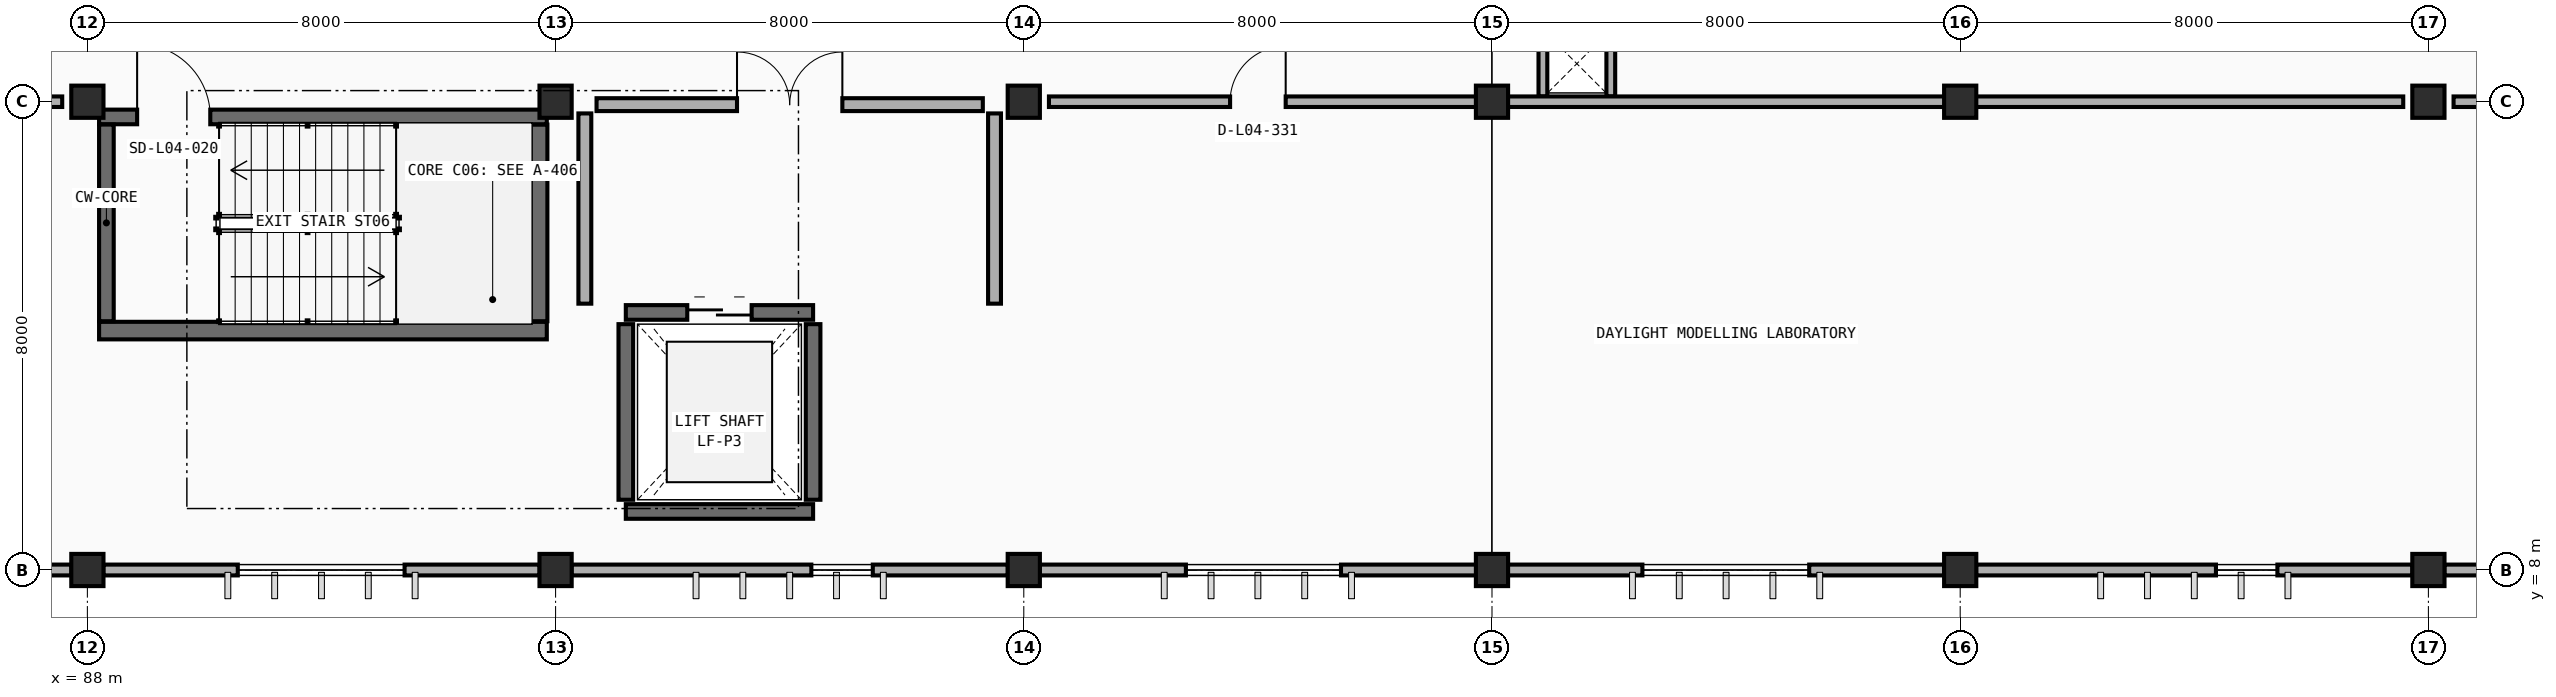
"""IFC4 building model, lengths in metres.
Left out: names, types, materials, properties, quantities, classifications, styles, units other than length and angle.
Written with IfcOpenShell. Run it as: python <this file> out.ifc"""

import sys

from ifc_helpers import new_model, si_unit, direction, frame, frame_2d, origin, origin_2d, place, context, subcontext, project, spatial, rectangle, extrude, element, fill, save


model = new_model("IFC4")
c1 = context("Model", 3, precision=1e-05, world=origin(), true_north=direction((0.0, 1.0)))
c2 = subcontext(c1, "Body", "Model", "MODEL_VIEW")
j1 = project(units=[si_unit("LENGTHUNIT", "METRE"), si_unit("PLANEANGLEUNIT", "RADIAN")], contexts=[c1])
p1 = place(None, origin())
s1 = spatial("IfcSite", under=j1, at=p1, CompositionType="ELEMENT")
p2 = place(p1, origin())
s2 = spatial("IfcBuilding", under=s1, at=p2, CompositionType="ELEMENT")
p3 = place(p2, frame((0.0, 0.0, 13.8)))
s3 = spatial("IfcBuildingStorey", under=s2, at=p3, CompositionType="ELEMENT", Elevation=13.8)
for number, where, z_axis, x_axis in (
    (1, (88.0, 8.0, 0.0), (0.0, 0.0, 1.0), (1.0, 0.0, 0.0)),
    (2, (96.0, 8.0, 0.0), (0.0, 0.0, 1.0), (1.0, 0.0, 0.0)),
    (3, (104.0, 8.0, 0.0), (0.0, 0.0, 1.0), (1.0, 0.0, 0.0)),
    (4, (112.0, 8.0, 0.0), (0.0, 0.0, 1.0), (1.0, 0.0, 0.0)),
    (5, (120.0, 8.0, 0.0), (0.0, 0.0, 1.0), (1.0, 0.0, 0.0)),
    (6, (128.0, 8.0, 0.0), (0.0, 0.0, 1.0), (1.0, 0.0, 0.0)),
    (7, (88.0, 16.0, 0.0), (0.0, 0.0, 1.0), (1.0, 0.0, 0.0)),
    (8, (96.0, 16.0, 0.0), (0.0, 0.0, 1.0), (1.0, 0.0, 0.0)),
    (9, (104.0, 16.0, 0.0), (0.0, 0.0, 1.0), (1.0, 0.0, 0.0)),
    (10, (112.0, 16.0, 0.0), (0.0, 0.0, 1.0), (1.0, 0.0, 0.0)),
    (11, (120.0, 16.0, 0.0), (0.0, 0.0, 1.0), (1.0, 0.0, 0.0)),
    (12, (128.0, 16.0, 0.0), (0.0, 0.0, 1.0), (1.0, 0.0, 0.0)),
):
    element("IfcColumn", number, at=place(p3, frame(where, z_axis=z_axis, x_axis=x_axis)), inside=s3, PredefinedType="COLUMN", context=c2, shape_type="SweptSolid", body=[
        extrude(rectangle(XDim=0.55, YDim=0.55, at=origin_2d()), origin(), (0.0, 0.0, 1.0), 4.2),
    ])
p4 = place(p3, frame((87.728, 8.0, 0.0), z_axis=(0.0, 0.0, 1.0), x_axis=(-1.0, 0.0, 0.0)))
e13 = element("IfcWall", 13, at=p4, inside=s3, PredefinedType="STANDARD", context=c2, shape_type="SweptSolid", body=[
    extrude(rectangle(XDim=7.456, YDim=0.185, at=frame_2d((3.728, 0.0))), origin(), (0.0, 0.0, 1.0), 3.325),
])
p5 = place(p4, frame((2.308, 0.0, 0.9)))
e14 = element("IfcOpeningElement", 14, at=p5, cuts=e13, PredefinedType="OPENING", context=c2, shape_type="SweptSolid", body=[
    extrude(rectangle(XDim=2.65, YDim=1.25, at=frame_2d((1.325, 0.625))), frame((0.0, 0.103, 0.0), z_axis=(0.0, -1.0, 0.0), x_axis=(1.0, 0.0, 0.0)), (0.0, 0.0, 1.0), 0.205),
])
p6 = place(p3, frame((95.728, 8.0, 0.0), z_axis=(0.0, 0.0, 1.0), x_axis=(-1.0, 0.0, 0.0)))
e15 = element("IfcWall", 15, at=p6, inside=s3, PredefinedType="STANDARD", context=c2, shape_type="SweptSolid", body=[
    extrude(rectangle(XDim=7.456, YDim=0.185, at=frame_2d((3.728, 0.0))), origin(), (0.0, 0.0, 1.0), 3.325),
])
p7 = place(p6, frame((2.308, 0.0, 0.9)))
e16 = element("IfcOpeningElement", 16, at=p7, cuts=e15, PredefinedType="OPENING", context=c2, shape_type="SweptSolid", body=[
    extrude(rectangle(XDim=2.85, YDim=1.25, at=frame_2d((1.425, 0.625))), frame((0.0, 0.103, 0.0), z_axis=(0.0, -1.0, 0.0), x_axis=(1.0, 0.0, 0.0)), (0.0, 0.0, 1.0), 0.205),
])
p8 = place(p3, frame((103.728, 8.0, 0.0), z_axis=(0.0, 0.0, 1.0), x_axis=(-1.0, 0.0, 0.0)))
e17 = element("IfcWall", 17, at=p8, inside=s3, PredefinedType="STANDARD", context=c2, shape_type="SweptSolid", body=[
    extrude(rectangle(XDim=7.456, YDim=0.185, at=frame_2d((3.728, 0.0))), origin(), (0.0, 0.0, 1.0), 3.325),
])
p9 = place(p8, frame((2.308, 0.0, 0.9)))
e18 = element("IfcOpeningElement", 18, at=p9, cuts=e17, PredefinedType="OPENING", context=c2, shape_type="SweptSolid", body=[
    extrude(rectangle(XDim=1.05, YDim=1.4, at=frame_2d((0.525, 0.7))), frame((0.0, 0.103, 0.0), z_axis=(0.0, -1.0, 0.0), x_axis=(1.0, 0.0, 0.0)), (0.0, 0.0, 1.0), 0.205),
])
p10 = place(p3, frame((111.728, 8.0, 0.0), z_axis=(0.0, 0.0, 1.0), x_axis=(-1.0, 0.0, 0.0)))
e19 = element("IfcWall", 19, at=p10, inside=s3, PredefinedType="STANDARD", context=c2, shape_type="SweptSolid", body=[
    extrude(rectangle(XDim=7.456, YDim=0.185, at=frame_2d((3.728, 0.0))), origin(), (0.0, 0.0, 1.0), 3.325),
])
p11 = place(p10, frame((2.308, 0.0, 0.9)))
e20 = element("IfcOpeningElement", 20, at=p11, cuts=e19, PredefinedType="OPENING", context=c2, shape_type="SweptSolid", body=[
    extrude(rectangle(XDim=2.65, YDim=1.25, at=frame_2d((1.325, 0.625))), frame((0.0, 0.103, 0.0), z_axis=(0.0, -1.0, 0.0), x_axis=(1.0, 0.0, 0.0)), (0.0, 0.0, 1.0), 0.205),
])
p12 = place(p3, frame((119.728, 8.0, 0.0), z_axis=(0.0, 0.0, 1.0), x_axis=(-1.0, 0.0, 0.0)))
e21 = element("IfcWall", 21, at=p12, inside=s3, PredefinedType="STANDARD", context=c2, shape_type="SweptSolid", body=[
    extrude(rectangle(XDim=7.456, YDim=0.185, at=frame_2d((3.728, 0.0))), origin(), (0.0, 0.0, 1.0), 3.325),
])
p13 = place(p12, frame((2.308, 0.0, 0.9)))
e22 = element("IfcOpeningElement", 22, at=p13, cuts=e21, PredefinedType="OPENING", context=c2, shape_type="SweptSolid", body=[
    extrude(rectangle(XDim=2.85, YDim=1.25, at=frame_2d((1.425, 0.625))), frame((0.0, 0.103, 0.0), z_axis=(0.0, -1.0, 0.0), x_axis=(1.0, 0.0, 0.0)), (0.0, 0.0, 1.0), 0.205),
])
p14 = place(p3, frame((127.728, 8.0, 0.0), z_axis=(0.0, 0.0, 1.0), x_axis=(-1.0, 0.0, 0.0)))
e23 = element("IfcWall", 23, at=p14, inside=s3, PredefinedType="STANDARD", context=c2, shape_type="SweptSolid", body=[
    extrude(rectangle(XDim=7.456, YDim=0.185, at=frame_2d((3.728, 0.0))), origin(), (0.0, 0.0, 1.0), 3.325),
])
p15 = place(p14, frame((2.308, 0.0, 0.9)))
e24 = element("IfcOpeningElement", 24, at=p15, cuts=e23, PredefinedType="OPENING", context=c2, shape_type="SweptSolid", body=[
    extrude(rectangle(XDim=1.05, YDim=1.4, at=frame_2d((0.525, 0.7))), frame((0.0, 0.103, 0.0), z_axis=(0.0, -1.0, 0.0), x_axis=(1.0, 0.0, 0.0)), (0.0, 0.0, 1.0), 0.205),
])
p16 = place(p3, frame((135.728, 8.0, 0.0), z_axis=(0.0, 0.0, 1.0), x_axis=(-1.0, 0.0, 0.0)))
e25 = element("IfcWall", 25, at=p16, inside=s3, PredefinedType="STANDARD", context=c2, shape_type="SweptSolid", body=[
    extrude(rectangle(XDim=7.456, YDim=0.185, at=frame_2d((3.728, 0.0))), origin(), (0.0, 0.0, 1.0), 3.325),
])
p17 = place(p16, frame((2.308, 0.0, 0.9)))
e26 = element("IfcOpeningElement", 26, at=p17, cuts=e25, PredefinedType="OPENING", context=c2, shape_type="SweptSolid", body=[
    extrude(rectangle(XDim=2.65, YDim=1.25, at=frame_2d((1.325, 0.625))), frame((0.0, 0.103, 0.0), z_axis=(0.0, -1.0, 0.0), x_axis=(1.0, 0.0, 0.0)), (0.0, 0.0, 1.0), 0.205),
])
p18 = place(p3, frame((88.2, 12.09, 0.0), z_axis=(0.0, 0.0, 1.0), x_axis=(1.0, 0.0, 0.0)))
e27 = element("IfcWall", 27, at=p18, inside=s3, PredefinedType="SHEAR", context=c2, shape_type="SweptSolid", body=[
    extrude(rectangle(XDim=7.65, YDim=0.3, at=frame_2d((3.825, 0.0))), origin(), (0.0, 0.0, 1.0), 4.2),
])
p19 = place(p3, frame((95.71, 12.25, 0.0), z_axis=(0.0, 0.0, 1.0), x_axis=(0.0, 1.0, 0.0)))
e28 = element("IfcWall", 28, at=p19, inside=s3, PredefinedType="SHEAR", context=c2, shape_type="SweptSolid", body=[
    extrude(rectangle(XDim=3.36, YDim=0.3, at=frame_2d((1.68, 0.0))), origin(), (0.0, 0.0, 1.0), 4.2),
])
p20 = place(p3, frame((88.2, 15.74, 0.0), z_axis=(0.0, 0.0, 1.0), x_axis=(1.0, 0.0, 0.0)))
e29 = element("IfcWall", 29, at=p20, inside=s3, PredefinedType="SOLIDWALL", context=c2, shape_type="SweptSolid", body=[
    extrude(rectangle(XDim=7.65, YDim=0.25, at=frame_2d((3.825, 0.0))), origin(), (0.0, 0.0, 1.0), 4.2),
])
p21 = place(p20, frame((0.65, 0.0, 0.0)))
e30 = element("IfcOpeningElement", 30, at=p21, cuts=e29, PredefinedType="OPENING", context=c2, shape_type="SweptSolid", body=[
    extrude(rectangle(XDim=1.25, YDim=2.15, at=frame_2d((0.625, 1.075))), frame((0.0, 0.135, 0.0), z_axis=(0.0, -1.0, 0.0), x_axis=(1.0, 0.0, 0.0)), (0.0, 0.0, 1.0), 0.27),
])
p22 = place(p3, frame((88.325, 12.25, 0.0), z_axis=(0.0, 0.0, 1.0), x_axis=(0.0, 1.0, 0.0)))
e31 = element("IfcWall", 31, at=p22, inside=s3, PredefinedType="SOLIDWALL", context=c2, shape_type="SweptSolid", body=[
    extrude(rectangle(XDim=3.36, YDim=0.25, at=frame_2d((1.68, 0.0))), origin(), (0.0, 0.0, 1.0), 4.2),
])
p23 = place(p3, frame((97.2, 9.0, 0.0), z_axis=(0.0, 0.0, 1.0), x_axis=(1.0, 0.0, 0.0)))
e32 = element("IfcWall", 32, at=p23, inside=s3, PredefinedType="SOLIDWALL", context=c2, shape_type="SweptSolid", body=[
    extrude(rectangle(XDim=3.2, YDim=0.25, at=frame_2d((1.6, 0.0))), origin(), (0.0, 0.0, 1.0), 4.2),
])
p24 = place(p3, frame((97.2, 12.4, 0.0), z_axis=(0.0, 0.0, 1.0), x_axis=(1.0, 0.0, 0.0)))
e33 = element("IfcWall", 33, at=p24, inside=s3, PredefinedType="SOLIDWALL", context=c2, shape_type="SweptSolid", body=[
    extrude(rectangle(XDim=3.2, YDim=0.25, at=frame_2d((1.6, 0.0))), origin(), (0.0, 0.0, 1.0), 4.2),
])
p25 = place(p24, frame((1.05, 0.0, 0.0)))
e34 = element("IfcOpeningElement", 34, at=p25, cuts=e33, PredefinedType="OPENING", context=c2, shape_type="SweptSolid", body=[
    extrude(rectangle(XDim=1.1, YDim=2.15, at=frame_2d((0.55, 1.075))), frame((0.0, 0.135, 0.0), z_axis=(0.0, -1.0, 0.0), x_axis=(1.0, 0.0, 0.0)), (0.0, 0.0, 1.0), 0.27),
])
for number, where, z_axis, x_axis in (
    (35, (97.2, 9.2, 0.0), (0.0, 0.0, 1.0), (0.0, 1.0, 0.0)),
    (36, (100.4, 9.2, 0.0), (0.0, 0.0, 1.0), (0.0, 1.0, 0.0)),
):
    element("IfcWall", number, at=place(p3, frame(where, z_axis=z_axis, x_axis=x_axis)), inside=s3, PredefinedType="SOLIDWALL", context=c2, shape_type="SweptSolid", body=[
        extrude(rectangle(XDim=3.0, YDim=0.25, at=frame_2d((1.5, 0.0))), origin(), (0.0, 0.0, 1.0), 4.2),
    ])
p26 = place(p3, frame((96.7, 15.95, 0.0), z_axis=(0.0, 0.0, 1.0), x_axis=(1.0, 0.0, 0.0)))
e37 = element("IfcWall", 37, at=p26, inside=s3, PredefinedType="PARTITIONING", context=c2, shape_type="SweptSolid", body=[
    extrude(rectangle(XDim=6.6, YDim=0.22, at=frame_2d((3.3, 0.0))), origin(), (0.0, 0.0, 1.0), 3.275),
])
p27 = place(p26, frame((2.4, 0.0, 0.0)))
e38 = element("IfcOpeningElement", 38, at=p27, cuts=e37, PredefinedType="OPENING", context=c2, shape_type="SweptSolid", body=[
    extrude(rectangle(XDim=1.8, YDim=2.2, at=frame_2d((0.9, 1.1))), frame((0.0, 0.12, 0.0), z_axis=(0.0, -1.0, 0.0), x_axis=(1.0, 0.0, 0.0)), (0.0, 0.0, 1.0), 0.24),
])
for number, where, z_axis, x_axis in (
    (39, (96.5, 12.55, 0.0), (0.0, 0.0, 1.0), (0.0, 1.0, 0.0)),
    (40, (103.5, 12.55, 0.0), (0.0, 0.0, 1.0), (0.0, 1.0, 0.0)),
):
    element("IfcWall", number, at=place(p3, frame(where, z_axis=z_axis, x_axis=x_axis)), inside=s3, PredefinedType="PARTITIONING", context=c2, shape_type="SweptSolid", body=[
        extrude(rectangle(XDim=3.25, YDim=0.22, at=frame_2d((1.625, 0.0))), origin(), (0.0, 0.0, 1.0), 3.225),
    ])
for number, where, z_axis, x_axis in (
    (41, (114.03, 16.09, 0.0), (0.0, 0.0, 1.0), (0.0, 1.0, 0.0)),
    (42, (112.87, 17.23, 0.0), (0.0, 0.0, 1.0), (0.0, -1.0, 0.0)),
):
    element("IfcWall", number, at=place(p3, frame(where, z_axis=z_axis, x_axis=x_axis)), inside=s3, PredefinedType="PARTITIONING", context=c2, shape_type="SweptSolid", body=[
        extrude(rectangle(XDim=1.14, YDim=0.15, at=frame_2d((0.57, 0.0))), origin(), (0.0, 0.0, 1.0), 3.9),
    ])
p28 = place(p3, frame((56.43, 16.0, 0.0), z_axis=(0.0, 0.0, 1.0), x_axis=(1.0, 0.0, 0.0)))
e43 = element("IfcWall", 43, at=p28, inside=s3, PredefinedType="PARTITIONING", context=c2, shape_type="SweptSolid", body=[
    extrude(rectangle(XDim=31.14, YDim=0.18, at=frame_2d((15.57, 0.0))), origin(), (0.0, 0.0, 1.0), 3.275),
])
p29 = place(p28, frame((3.11, 0.0, 0.0)))
e44 = element("IfcOpeningElement", 44, at=p29, cuts=e43, PredefinedType="OPENING", context=c2, shape_type="SweptSolid", body=[
    extrude(rectangle(XDim=0.92, YDim=2.15, at=frame_2d((0.46, 1.075))), frame((0.0, 0.1, 0.0), z_axis=(0.0, -1.0, 0.0), x_axis=(1.0, 0.0, 0.0)), (0.0, 0.0, 1.0), 0.2),
])
p30 = place(p28, frame((26.68, 0.0, 0.0)))
e45 = element("IfcOpeningElement", 45, at=p30, cuts=e43, PredefinedType="OPENING", context=c2, shape_type="SweptSolid", body=[
    extrude(rectangle(XDim=0.92, YDim=2.15, at=frame_2d((0.46, 1.075))), frame((0.0, 0.1, 0.0), z_axis=(0.0, -1.0, 0.0), x_axis=(1.0, 0.0, 0.0)), (0.0, 0.0, 1.0), 0.2),
])
p31 = place(p3, frame((104.43, 16.0, 0.0), z_axis=(0.0, 0.0, 1.0), x_axis=(1.0, 0.0, 0.0)))
e46 = element("IfcWall", 46, at=p31, inside=s3, PredefinedType="PARTITIONING", context=c2, shape_type="SweptSolid", body=[
    extrude(rectangle(XDim=23.14, YDim=0.18, at=frame_2d((11.57, 0.0))), origin(), (0.0, 0.0, 1.0), 3.275),
])
p32 = place(p31, frame((3.095, 0.0, 0.0)))
e47 = element("IfcOpeningElement", 47, at=p32, cuts=e46, PredefinedType="OPENING", context=c2, shape_type="SweptSolid", body=[
    extrude(rectangle(XDim=0.95, YDim=2.1, at=frame_2d((0.475, 1.05))), frame((0.0, 0.1, 0.0), z_axis=(0.0, -1.0, 0.0), x_axis=(1.0, 0.0, 0.0)), (0.0, 0.0, 1.0), 0.2),
])
p33 = place(p3, frame((128.43, 16.0, 0.0), z_axis=(0.0, 0.0, 1.0), x_axis=(1.0, 0.0, 0.0)))
e48 = element("IfcWall", 48, at=p33, inside=s3, PredefinedType="PARTITIONING", context=c2, shape_type="SweptSolid", body=[
    extrude(rectangle(XDim=15.14, YDim=0.18, at=frame_2d((7.57, 0.0))), origin(), (0.0, 0.0, 1.0), 3.275),
])
p34 = place(p33, frame((3.07, 0.0, 0.0)))
e49 = element("IfcOpeningElement", 49, at=p34, cuts=e48, PredefinedType="OPENING", context=c2, shape_type="SweptSolid", body=[
    extrude(rectangle(XDim=1.0, YDim=2.15, at=frame_2d((0.5, 1.075))), frame((0.0, 0.1, 0.0), z_axis=(0.0, -1.0, 0.0), x_axis=(1.0, 0.0, 0.0)), (0.0, 0.0, 1.0), 0.2),
])
p35 = place(p7, origin())
e50 = element("IfcWindow", 50, at=p35, inside=s3, PartitioningType="DOUBLE_PANEL_VERTICAL", PredefinedType="WINDOW", context=c2, shape_type="SweptSolid", body=[
    extrude(rectangle(XDim=2.85, YDim=1.25, at=frame_2d((1.425, 0.625))), frame((0.0, 0.03, 0.0), z_axis=(0.0, -1.0, 0.0), x_axis=(1.0, 0.0, 0.0)), (0.0, 0.0, 1.0), 0.06),
])
fill(e16, e50)
p36 = place(p9, origin())
e51 = element("IfcWindow", 51, at=p36, inside=s3, PartitioningType="SINGLE_PANEL", PredefinedType="WINDOW", context=c2, shape_type="SweptSolid", body=[
    extrude(rectangle(XDim=1.05, YDim=1.4, at=frame_2d((0.525, 0.7))), frame((0.0, 0.03, 0.0), z_axis=(0.0, -1.0, 0.0), x_axis=(1.0, 0.0, 0.0)), (0.0, 0.0, 1.0), 0.06),
])
fill(e18, e51)
p37 = place(p11, origin())
e52 = element("IfcWindow", 52, at=p37, inside=s3, PartitioningType="DOUBLE_PANEL_VERTICAL", PredefinedType="WINDOW", context=c2, shape_type="SweptSolid", body=[
    extrude(rectangle(XDim=2.65, YDim=1.25, at=frame_2d((1.325, 0.625))), frame((0.0, 0.03, 0.0), z_axis=(0.0, -1.0, 0.0), x_axis=(1.0, 0.0, 0.0)), (0.0, 0.0, 1.0), 0.06),
])
fill(e20, e52)
p38 = place(p13, origin())
e53 = element("IfcWindow", 53, at=p38, inside=s3, PartitioningType="DOUBLE_PANEL_VERTICAL", PredefinedType="WINDOW", context=c2, shape_type="SweptSolid", body=[
    extrude(rectangle(XDim=2.85, YDim=1.25, at=frame_2d((1.425, 0.625))), frame((0.0, 0.03, 0.0), z_axis=(0.0, -1.0, 0.0), x_axis=(1.0, 0.0, 0.0)), (0.0, 0.0, 1.0), 0.06),
])
fill(e22, e53)
p39 = place(p15, origin())
e54 = element("IfcWindow", 54, at=p39, inside=s3, PartitioningType="SINGLE_PANEL", PredefinedType="WINDOW", context=c2, shape_type="SweptSolid", body=[
    extrude(rectangle(XDim=1.05, YDim=1.4, at=frame_2d((0.525, 0.7))), frame((0.0, 0.03, 0.0), z_axis=(0.0, -1.0, 0.0), x_axis=(1.0, 0.0, 0.0)), (0.0, 0.0, 1.0), 0.06),
])
fill(e24, e54)
p40 = place(p21, origin())
e55 = element("IfcDoor", 55, at=p40, inside=s3, OperationType="SINGLE_SWING_LEFT", PredefinedType="DOOR", context=c2, shape_type="SweptSolid", body=[
    extrude(rectangle(XDim=1.25, YDim=2.15, at=frame_2d((0.625, 1.075))), frame((0.0, 0.025, 0.0), z_axis=(0.0, -1.0, 0.0), x_axis=(1.0, 0.0, 0.0)), (0.0, 0.0, 1.0), 0.05),
])
fill(e30, e55)
p41 = place(p25, origin())
e56 = element("IfcDoor", 56, at=p41, inside=s3, OperationType="DOUBLE_DOOR_SLIDING", PredefinedType="DOOR", context=c2, shape_type="SweptSolid", body=[
    extrude(rectangle(XDim=1.1, YDim=2.15, at=frame_2d((0.55, 1.075))), frame((0.0, 0.025, 0.0), z_axis=(0.0, -1.0, 0.0), x_axis=(1.0, 0.0, 0.0)), (0.0, 0.0, 1.0), 0.05),
])
fill(e34, e56)
p42 = place(p27, origin())
e57 = element("IfcDoor", 57, at=p42, inside=s3, OperationType="DOUBLE_DOOR_SINGLE_SWING", PredefinedType="DOOR", context=c2, shape_type="SweptSolid", body=[
    extrude(rectangle(XDim=1.8, YDim=2.2, at=frame_2d((0.9, 1.1))), frame((0.0, 0.025, 0.0), z_axis=(0.0, -1.0, 0.0), x_axis=(1.0, 0.0, 0.0)), (0.0, 0.0, 1.0), 0.05),
])
fill(e38, e57)
p43 = place(p32, origin())
e58 = element("IfcDoor", 58, at=p43, inside=s3, OperationType="SINGLE_SWING_RIGHT", PredefinedType="DOOR", context=c2, shape_type="SweptSolid", body=[
    extrude(rectangle(XDim=0.95, YDim=2.1, at=frame_2d((0.475, 1.05))), frame((0.0, 0.025, 0.0), z_axis=(0.0, -1.0, 0.0), x_axis=(1.0, 0.0, 0.0)), (0.0, 0.0, 1.0), 0.05),
])
fill(e47, e58)
save(model, sys.argv[1])
